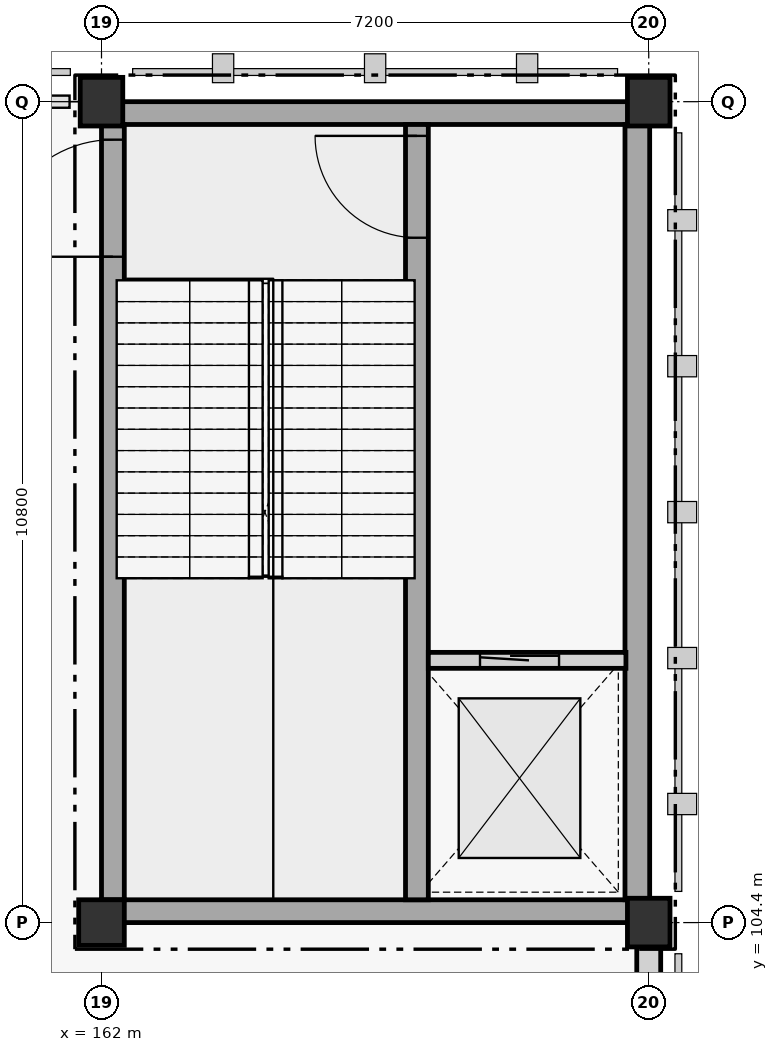
"""IFC4 building model, lengths in metres.
Left out: names, types, materials, properties, quantities, classifications, styles, units other than length and angle.
Written with IfcOpenShell. Run it as: python <this file> out.ifc"""

import sys

from ifc_helpers import new_model, si_unit, direction, frame, frame_2d, origin, origin_2d, place, context, subcontext, project, spatial, rectangle, extrude, element, fill, save


model = new_model("IFC4")
c1 = context("Model", 3, precision=1e-05, world=origin(), true_north=direction((0.0, 1.0)))
c2 = subcontext(c1, "Body", "Model", "MODEL_VIEW")
j1 = project(units=[si_unit("LENGTHUNIT", "METRE"), si_unit("PLANEANGLEUNIT", "RADIAN")], contexts=[c1])
p1 = place(None, origin())
s1 = spatial("IfcSite", under=j1, at=p1, CompositionType="ELEMENT")
p2 = place(p1, origin())
s2 = spatial("IfcBuilding", under=s1, at=p2, CompositionType="ELEMENT")
p3 = place(p2, frame((0.0, 0.0, 5.4)))
s3 = spatial("IfcBuildingStorey", under=s2, at=p3, CompositionType="ELEMENT", Elevation=5.4)
p4 = place(p3, frame((162.0, 104.4, 0.0), z_axis=(0.0, 0.0, 1.0), x_axis=(1.0, 0.0, 0.0)))
e1 = element("IfcColumn", 1, at=p4, inside=s3, PredefinedType="COLUMN", context=c2, shape_type="SweptSolid", body=[
    extrude(rectangle(XDim=0.6, YDim=0.6, at=origin_2d()), origin(), (0.0, 0.0, 1.0), 5.4),
])
for number, where, z_axis, x_axis in (
    (2, (162.0, 115.2, 0.0), (0.0, 0.0, 1.0), (1.0, 0.0, 0.0)),
    (3, (169.2, 104.4, 0.0), (0.0, 0.0, 1.0), (1.0, 0.0, 0.0)),
    (4, (169.2, 115.2, 0.0), (0.0, 0.0, 1.0), (1.0, 0.0, 0.0)),
):
    element("IfcColumn", number, at=place(p3, frame(where, z_axis=z_axis, x_axis=x_axis)), inside=s3, PredefinedType="COLUMN", context=c2, shape_type="SweptSolid", body=[
        extrude(rectangle(XDim=0.56, YDim=0.64, at=origin_2d()), origin(), (0.0, 0.0, 1.0), 5.4),
    ])
for number, where, z_axis, x_axis in (
    (5, (169.2, 104.55, 0.0), (0.0, 0.0, 1.0), (-1.0, 0.0, 0.0)),
    (6, (162.0, 115.05, 0.0), (0.0, 0.0, 1.0), (1.0, 0.0, 0.0)),
):
    element("IfcWall", number, at=place(p3, frame(where, z_axis=z_axis, x_axis=x_axis)), inside=s3, PredefinedType="SHEAR", context=c2, shape_type="SweptSolid", body=[
        extrude(rectangle(XDim=7.2, YDim=0.3, at=frame_2d((3.6, 0.0))), origin(), (0.0, 0.0, 1.0), 5.4),
    ])
p5 = place(p3, frame((162.15, 104.7, 0.0), z_axis=(0.0, 0.0, 1.0), x_axis=(0.0, 1.0, 0.0)))
e7 = element("IfcWall", 7, at=p5, inside=s3, PredefinedType="SHEAR", context=c2, shape_type="SweptSolid", body=[
    extrude(rectangle(XDim=10.2, YDim=0.3, at=frame_2d((5.1, 0.0))), origin(), (0.0, 0.0, 1.0), 5.4),
])
p6 = place(p5, frame((8.46, 0.0, 0.0)))
e8 = element("IfcOpeningElement", 8, at=p6, cuts=e7, PredefinedType="OPENING", context=c2, shape_type="SweptSolid", body=[
    extrude(rectangle(XDim=1.54, YDim=2.22, at=frame_2d((0.77, 1.11))), frame((0.0, 0.15, 0.0), z_axis=(0.0, -1.0, 0.0), x_axis=(1.0, 0.0, 0.0)), (0.0, 0.0, 1.0), 0.3),
])
p7 = place(p3, frame((169.05, 114.9, 0.0), z_axis=(0.0, 0.0, 1.0), x_axis=(0.0, -1.0, 0.0)))
e9 = element("IfcWall", 9, at=p7, inside=s3, PredefinedType="SHEAR", context=c2, shape_type="SweptSolid", body=[
    extrude(rectangle(XDim=10.2, YDim=0.325, at=frame_2d((5.1, 0.0))), origin(), (0.0, 0.0, 1.0), 5.4),
])
p8 = place(p3, frame((166.15, 104.7, 0.0), z_axis=(0.0, 0.0, 1.0), x_axis=(0.0, 1.0, 0.0)))
e10 = element("IfcWall", 10, at=p8, inside=s3, PredefinedType="SHEAR", context=c2, shape_type="SweptSolid", body=[
    extrude(rectangle(XDim=10.2, YDim=0.3, at=frame_2d((5.1, 0.0))), origin(), (0.0, 0.0, 1.0), 5.4),
])
p9 = place(p8, frame((8.71, 0.0, 0.0)))
e11 = element("IfcOpeningElement", 11, at=p9, cuts=e10, PredefinedType="OPENING", context=c2, shape_type="SweptSolid", body=[
    extrude(rectangle(XDim=1.34, YDim=2.18, at=frame_2d((0.67, 1.09))), frame((0.0, 0.15, 0.0), z_axis=(0.0, -1.0, 0.0), x_axis=(1.0, 0.0, 0.0)), (0.0, 0.0, 1.0), 0.3),
])
p10 = place(p3, frame((169.2, 104.084, 0.0), z_axis=(0.0, 0.0, 1.0), x_axis=(0.0, -1.0, 0.0)))
e12 = element("IfcWall", 12, at=p10, inside=s3, PredefinedType="STANDARD", context=c2, shape_type="SweptSolid", body=[
    extrude(rectangle(XDim=6.568, YDim=0.315, at=frame_2d((3.284, 0.0))), origin(), (0.0, 0.0, 1.0), 4.515),
])
p11 = place(p10, frame((2.374, 0.0, 0.9)))
e13 = element("IfcOpeningElement", 13, at=p11, cuts=e12, PredefinedType="OPENING", context=c2, shape_type="SweptSolid", body=[
    extrude(rectangle(XDim=1.82, YDim=1.84, at=frame_2d((0.91, 0.92))), frame((0.0, 0.157, 0.0), z_axis=(0.0, -1.0, 0.0), x_axis=(1.0, 0.0, 0.0)), (0.0, 0.0, 1.0), 0.315),
])
p12 = place(p3, frame((166.3, 107.85, 0.0), z_axis=(0.0, 0.0, 1.0), x_axis=(1.0, 0.0, 0.0)))
e14 = element("IfcWall", 14, at=p12, inside=s3, PredefinedType="STANDARD", context=c2, shape_type="SweptSolid", body=[
    extrude(rectangle(XDim=2.6, YDim=0.21, at=frame_2d((1.3, 0.0))), origin(), (0.0, 0.0, 1.0), 5.4),
])
p13 = place(p12, frame((0.68, 0.0, 0.0)))
e15 = element("IfcOpeningElement", 15, at=p13, cuts=e14, PredefinedType="OPENING", context=c2, shape_type="SweptSolid", body=[
    extrude(rectangle(XDim=1.04, YDim=2.16, at=frame_2d((0.52, 1.08))), frame((0.0, 0.105, 0.0), z_axis=(0.0, -1.0, 0.0), x_axis=(1.0, 0.0, 0.0)), (0.0, 0.0, 1.0), 0.21),
])
p14 = place(p13, origin())
e16 = element("IfcDoor", 16, at=p14, inside=s3, OperationType="SLIDING_TO_LEFT", PredefinedType="DOOR", context=c2, shape_type="SweptSolid", body=[
    extrude(rectangle(XDim=1.04, YDim=2.16, at=frame_2d((0.52, 1.08))), frame((0.0, 0.025, 0.0), z_axis=(0.0, -1.0, 0.0), x_axis=(1.0, 0.0, 0.0)), (0.0, 0.0, 1.0), 0.05),
])
fill(e15, e16)
p15 = place(p9, origin())
e17 = element("IfcDoor", 17, at=p15, inside=s3, OperationType="SINGLE_SWING_RIGHT", PredefinedType="DOOR", context=c2, shape_type="SweptSolid", body=[
    extrude(rectangle(XDim=1.34, YDim=2.18, at=frame_2d((0.67, 1.09))), frame((0.0, 0.025, 0.0), z_axis=(0.0, -1.0, 0.0), x_axis=(1.0, 0.0, 0.0)), (0.0, 0.0, 1.0), 0.05),
])
fill(e11, e17)
p16 = place(p6, origin())
e18 = element("IfcDoor", 18, at=p16, inside=s3, OperationType="SINGLE_SWING_LEFT", PredefinedType="DOOR", context=c2, shape_type="SweptSolid", body=[
    extrude(rectangle(XDim=1.54, YDim=2.22, at=frame_2d((0.77, 1.11))), frame((0.0, 0.025, 0.0), z_axis=(0.0, -1.0, 0.0), x_axis=(1.0, 0.0, 0.0)), (0.0, 0.0, 1.0), 0.05),
])
fill(e8, e18)
save(model, sys.argv[1])
